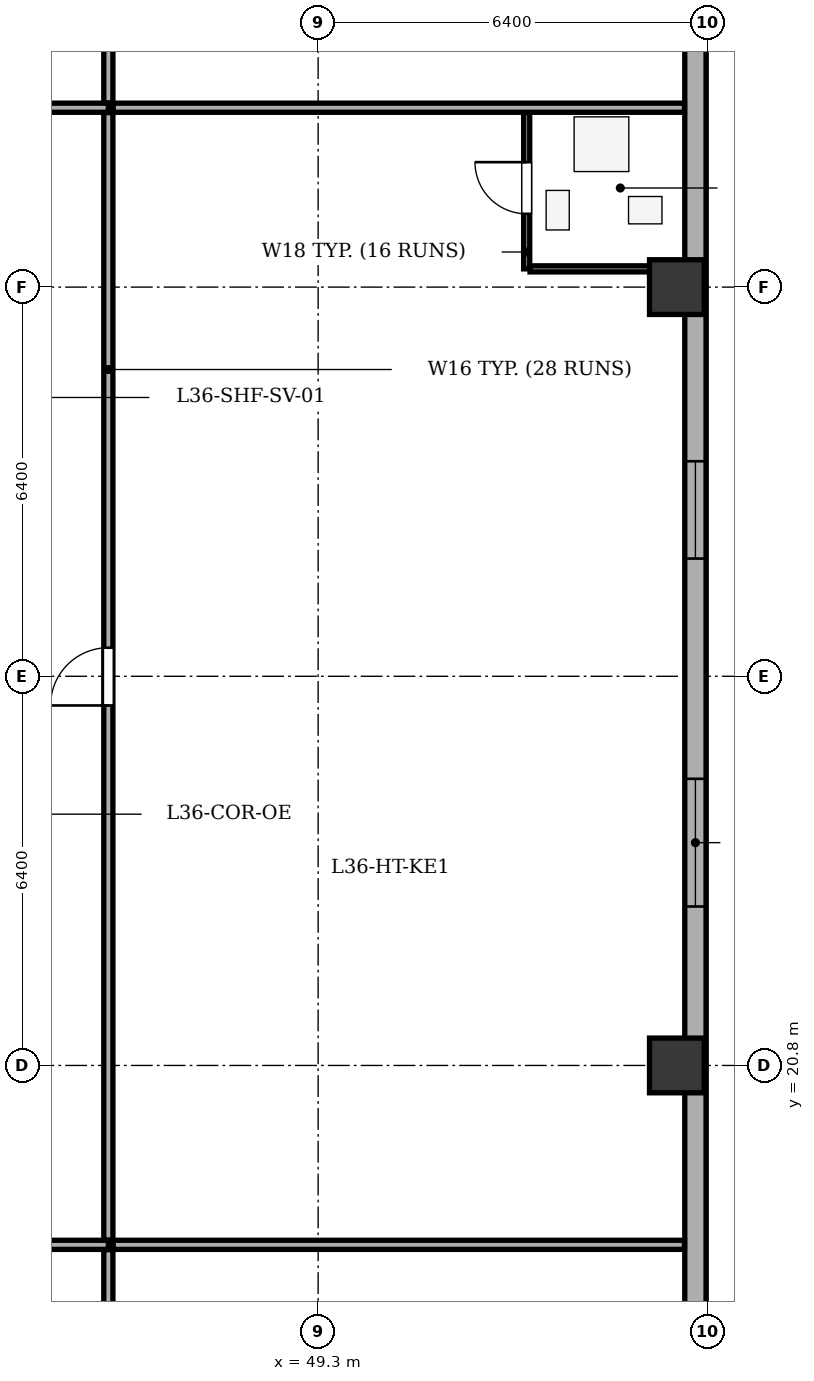
"""IFC4 building model, lengths in metres.
Left out: names, types, materials, properties, quantities, classifications, styles, units other than length and angle.
Written with IfcOpenShell. Run it as: python <this file> out.ifc"""

import sys

from ifc_helpers import new_model, si_unit, direction, frame, frame_2d, origin, origin_2d, place, context, subcontext, project, spatial, rectangle, extrude, element, fill, save


model = new_model("IFC4")
c1 = context("Model", 3, precision=1e-05, world=origin(), true_north=direction((0.0, 1.0)))
c2 = subcontext(c1, "Body", "Model", "MODEL_VIEW")
j1 = project(units=[si_unit("LENGTHUNIT", "METRE"), si_unit("PLANEANGLEUNIT", "RADIAN")], contexts=[c1])
p1 = place(None, origin())
s1 = spatial("IfcSite", under=j1, at=p1, CompositionType="ELEMENT")
p2 = place(p1, origin())
s2 = spatial("IfcBuilding", under=s1, at=p2, CompositionType="ELEMENT")
p3 = place(p2, frame((0.0, 0.0, 144.8)))
s3 = spatial("IfcBuildingStorey", under=s2, at=p3, CompositionType="ELEMENT", Elevation=144.8)
for number, where, z_axis, x_axis in (
    (1, (55.2, 20.8, 0.0), (0.0, 0.0, 1.0), (1.0, 0.0, 0.0)),
    (2, (55.2, 33.6, 0.0), (0.0, 0.0, 1.0), (1.0, 0.0, 0.0)),
):
    element("IfcColumn", number, at=place(p3, frame(where, z_axis=z_axis, x_axis=x_axis)), inside=s3, PredefinedType="COLUMN", context=c2, shape_type="SweptSolid", body=[
        extrude(rectangle(XDim=0.9, YDim=0.9, at=origin_2d()), origin(), (0.0, 0.0, 1.0), 3.5),
    ])
p4 = place(p3, frame((55.505, 41.5, 0.0), z_axis=(0.0, 0.0, 1.0), x_axis=(0.0, -1.0, 0.0)))
e3 = element("IfcWall", 3, at=p4, inside=s3, PredefinedType="STANDARD", context=c2, shape_type="SweptSolid", body=[
    extrude(rectangle(XDim=35.0, YDim=0.35, at=frame_2d((17.5, 0.0))), origin(), (0.0, 0.0, 1.0), 2.785),
])
p5 = place(p4, frame((1.813, 0.0, 0.75)))
e4 = element("IfcOpeningElement", 4, at=p5, cuts=e3, PredefinedType="OPENING", context=c2, shape_type="SweptSolid", body=[
    extrude(rectangle(XDim=1.6, YDim=1.75, at=frame_2d((0.8, 0.875))), frame((0.0, 0.185, 0.0), z_axis=(0.0, -1.0, 0.0), x_axis=(1.0, 0.0, 0.0)), (0.0, 0.0, 1.0), 0.37),
])
p6 = place(p4, frame((10.764, 0.0, 0.75)))
e5 = element("IfcOpeningElement", 5, at=p6, cuts=e3, PredefinedType="OPENING", context=c2, shape_type="SweptSolid", body=[
    extrude(rectangle(XDim=1.6, YDim=1.75, at=frame_2d((0.8, 0.875))), frame((0.0, 0.185, 0.0), z_axis=(0.0, -1.0, 0.0), x_axis=(1.0, 0.0, 0.0)), (0.0, 0.0, 1.0), 0.37),
])
p7 = place(p4, frame((15.986, 0.0, 0.75)))
e6 = element("IfcOpeningElement", 6, at=p7, cuts=e3, PredefinedType="OPENING", context=c2, shape_type="SweptSolid", body=[
    extrude(rectangle(XDim=2.1, YDim=1.75, at=frame_2d((1.05, 0.875))), frame((0.0, 0.185, 0.0), z_axis=(0.0, -1.0, 0.0), x_axis=(1.0, 0.0, 0.0)), (0.0, 0.0, 1.0), 0.37),
])
p8 = place(p4, frame((25.97, 0.0, 0.75)))
e7 = element("IfcOpeningElement", 7, at=p8, cuts=e3, PredefinedType="OPENING", context=c2, shape_type="SweptSolid", body=[
    extrude(rectangle(XDim=1.6, YDim=1.75, at=frame_2d((0.8, 0.875))), frame((0.0, 0.185, 0.0), z_axis=(0.0, -1.0, 0.0), x_axis=(1.0, 0.0, 0.0)), (0.0, 0.0, 1.0), 0.37),
])
p9 = place(p4, frame((30.555, 0.0, 0.75)))
e8 = element("IfcOpeningElement", 8, at=p9, cuts=e3, PredefinedType="OPENING", context=c2, shape_type="SweptSolid", body=[
    extrude(rectangle(XDim=2.1, YDim=1.75, at=frame_2d((1.05, 0.875))), frame((0.0, 0.185, 0.0), z_axis=(0.0, -1.0, 0.0), x_axis=(1.0, 0.0, 0.0)), (0.0, 0.0, 1.0), 0.37),
])
p10 = place(p3, frame((30.252, 17.85, 0.0), z_axis=(0.0, 0.0, 1.0), x_axis=(1.0, 0.0, 0.0)))
e9 = element("IfcWall", 9, at=p10, inside=s3, PredefinedType="PARTITIONING", context=c2, shape_type="SweptSolid", body=[
    extrude(rectangle(XDim=15.598, YDim=0.15, at=frame_2d((7.799, 0.0))), origin(), (0.0, 0.0, 1.0), 3.2),
])
p11 = place(p10, frame((7.239, 0.0, 0.0)))
e10 = element("IfcOpeningElement", 10, at=p11, cuts=e9, PredefinedType="OPENING", context=c2, shape_type="SweptSolid", body=[
    extrude(rectangle(XDim=1.0, YDim=2.1, at=frame_2d((0.5, 1.05))), frame((0.0, 0.085, 0.0), z_axis=(0.0, -1.0, 0.0), x_axis=(1.0, 0.0, 0.0)), (0.0, 0.0, 1.0), 0.17),
])
p12 = place(p3, frame((45.85, 1.875, 0.0), z_axis=(0.0, 0.0, 1.0), x_axis=(0.0, 1.0, 0.0)))
e11 = element("IfcWall", 11, at=p12, inside=s3, PredefinedType="PARTITIONING", context=c2, shape_type="SweptSolid", body=[
    extrude(rectangle(XDim=15.895, YDim=0.15, at=frame_2d((7.948, 0.0))), origin(), (0.0, 0.0, 1.0), 3.2),
])
p13 = place(p3, frame((41.771, 36.55, 0.0), z_axis=(0.0, 0.0, 1.0), x_axis=(1.0, 0.0, 0.0)))
e12 = element("IfcWall", 12, at=p13, inside=s3, PredefinedType="PARTITIONING", context=c2, shape_type="SweptSolid", body=[
    extrude(rectangle(XDim=4.079, YDim=0.15, at=frame_2d((2.04, 0.0))), origin(), (0.0, 0.0, 1.0), 3.2),
])
p14 = place(p13, frame((1.56, 0.0, 0.0)))
e13 = element("IfcOpeningElement", 13, at=p14, cuts=e12, PredefinedType="OPENING", context=c2, shape_type="SweptSolid", body=[
    extrude(rectangle(XDim=0.95, YDim=2.1, at=frame_2d((0.475, 1.05))), frame((0.0, 0.085, 0.0), z_axis=(0.0, -1.0, 0.0), x_axis=(1.0, 0.0, 0.0)), (0.0, 0.0, 1.0), 0.17),
])
p15 = place(p3, frame((45.85, 36.63, 0.0), z_axis=(0.0, 0.0, 1.0), x_axis=(0.0, 1.0, 0.0)))
e14 = element("IfcWall", 14, at=p15, inside=s3, PredefinedType="PARTITIONING", context=c2, shape_type="SweptSolid", body=[
    extrude(rectangle(XDim=9.495, YDim=0.15, at=frame_2d((4.748, 0.0))), origin(), (0.0, 0.0, 1.0), 3.2),
])
for number, where, z_axis, x_axis in (
    (15, (45.93, 17.85, 0.0), (0.0, 0.0, 1.0), (1.0, 0.0, 0.0)),
    (16, (45.93, 36.55, 0.0), (0.0, 0.0, 1.0), (1.0, 0.0, 0.0)),
):
    element("IfcWall", number, at=place(p3, frame(where, z_axis=z_axis, x_axis=x_axis)), inside=s3, PredefinedType="PARTITIONING", context=c2, shape_type="SweptSolid", body=[
        extrude(rectangle(XDim=9.395, YDim=0.15, at=frame_2d((4.698, 0.0))), origin(), (0.0, 0.0, 1.0), 3.2),
    ])
p16 = place(p3, frame((45.85, 17.93, 0.0), z_axis=(0.0, 0.0, 1.0), x_axis=(0.0, 1.0, 0.0)))
e17 = element("IfcWall", 17, at=p16, inside=s3, PredefinedType="PARTITIONING", context=c2, shape_type="SweptSolid", body=[
    extrude(rectangle(XDim=18.54, YDim=0.15, at=frame_2d((9.27, 0.0))), origin(), (0.0, 0.0, 1.0), 3.2),
])
p17 = place(p16, frame((8.79, 0.0, 0.0)))
e18 = element("IfcOpeningElement", 18, at=p17, cuts=e17, PredefinedType="OPENING", context=c2, shape_type="SweptSolid", body=[
    extrude(rectangle(XDim=0.95, YDim=2.1, at=frame_2d((0.475, 1.05))), frame((0.0, 0.085, 0.0), z_axis=(0.0, -1.0, 0.0), x_axis=(1.0, 0.0, 0.0)), (0.0, 0.0, 1.0), 0.17),
])
p18 = place(p3, frame((52.73, 33.9, 0.0), z_axis=(0.0, 0.0, 1.0), x_axis=(0.0, 1.0, 0.0)))
e19 = element("IfcWall", 19, at=p18, inside=s3, PredefinedType="PARTITIONING", context=c2, shape_type="SweptSolid", body=[
    extrude(rectangle(XDim=2.57, YDim=0.1, at=frame_2d((1.285, 0.0))), origin(), (0.0, 0.0, 1.0), 3.2),
])
p19 = place(p18, frame((0.905, 0.0, 0.0)))
e20 = element("IfcOpeningElement", 20, at=p19, cuts=e19, PredefinedType="OPENING", context=c2, shape_type="SweptSolid", body=[
    extrude(rectangle(XDim=0.85, YDim=2.05, at=frame_2d((0.425, 1.025))), frame((0.0, 0.06, 0.0), z_axis=(0.0, -1.0, 0.0), x_axis=(1.0, 0.0, 0.0)), (0.0, 0.0, 1.0), 0.12),
])
p20 = place(p3, frame((52.785, 33.9, 0.0), z_axis=(0.0, 0.0, 1.0), x_axis=(1.0, 0.0, 0.0)))
e21 = element("IfcWall", 21, at=p20, inside=s3, PredefinedType="PARTITIONING", context=c2, shape_type="SweptSolid", body=[
    extrude(rectangle(XDim=2.54, YDim=0.1, at=frame_2d((1.27, 0.0))), origin(), (0.0, 0.0, 1.0), 2.535),
])
p21 = place(p6, origin())
e22 = element("IfcWindow", 22, at=p21, inside=s3, PartitioningType="SINGLE_PANEL", PredefinedType="WINDOW", context=c2, shape_type="SweptSolid", body=[
    extrude(rectangle(XDim=1.6, YDim=1.75, at=frame_2d((0.8, 0.875))), frame((0.0, -0.01, 0.0), z_axis=(0.0, -1.0, 0.0), x_axis=(1.0, 0.0, 0.0)), (0.0, 0.0, 1.0), 0.06),
])
fill(e5, e22)
p22 = place(p7, origin())
e23 = element("IfcWindow", 23, at=p22, inside=s3, PartitioningType="SINGLE_PANEL", PredefinedType="WINDOW", context=c2, shape_type="SweptSolid", body=[
    extrude(rectangle(XDim=2.1, YDim=1.75, at=frame_2d((1.05, 0.875))), frame((0.0, -0.01, 0.0), z_axis=(0.0, -1.0, 0.0), x_axis=(1.0, 0.0, 0.0)), (0.0, 0.0, 1.0), 0.06),
])
fill(e6, e23)
p23 = place(p19, origin())
e24 = element("IfcDoor", 24, at=p23, inside=s3, OperationType="SINGLE_SWING_RIGHT", PredefinedType="DOOR", context=c2, shape_type="SweptSolid", body=[
    extrude(rectangle(XDim=0.85, YDim=2.05, at=frame_2d((0.425, 1.025))), frame((0.0, 0.025, 0.0), z_axis=(0.0, -1.0, 0.0), x_axis=(1.0, 0.0, 0.0)), (0.0, 0.0, 1.0), 0.05),
])
fill(e20, e24)
p24 = place(p17, origin())
e25 = element("IfcDoor", 25, at=p24, inside=s3, OperationType="SINGLE_SWING_LEFT", PredefinedType="DOOR", context=c2, shape_type="SweptSolid", body=[
    extrude(rectangle(XDim=0.95, YDim=2.1, at=frame_2d((0.475, 1.05))), frame((0.0, 0.025, 0.0), z_axis=(0.0, -1.0, 0.0), x_axis=(1.0, 0.0, 0.0)), (0.0, 0.0, 1.0), 0.05),
])
fill(e18, e25)
save(model, sys.argv[1])
